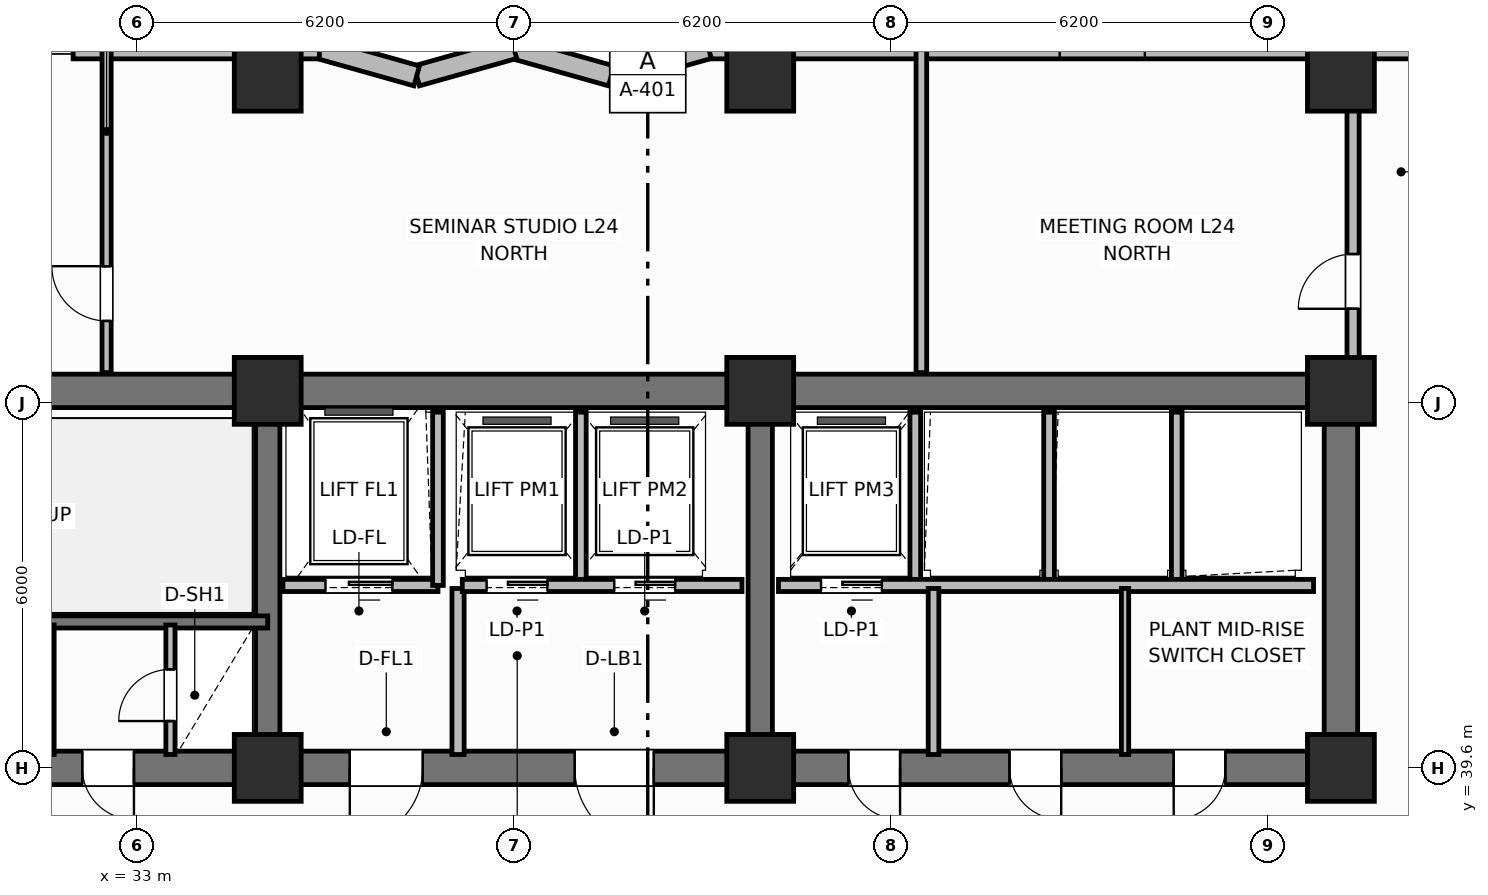
"""IFC4 building model, lengths in metres.
Left out: names, types, materials, properties, quantities, classifications, styles, units other than length and angle.
Written with IfcOpenShell. Run it as: python <this file> out.ifc"""

import sys

from ifc_helpers import new_model, si_unit, direction, frame, frame_2d, origin, origin_2d, place, context, subcontext, project, spatial, rectangle, extrude, element, fill, save


model = new_model("IFC4")
c1 = context("Model", 3, precision=1e-05, world=origin(), true_north=direction((0.0, 1.0)))
c2 = subcontext(c1, "Body", "Model", "MODEL_VIEW")
j1 = project(units=[si_unit("LENGTHUNIT", "METRE"), si_unit("PLANEANGLEUNIT", "RADIAN")], contexts=[c1])
p1 = place(None, origin())
s1 = spatial("IfcSite", under=j1, at=p1, CompositionType="ELEMENT")
p2 = place(p1, origin())
s2 = spatial("IfcBuilding", under=s1, at=p2, CompositionType="ELEMENT")
p3 = place(p2, frame((0.0, 0.0, 99.4)))
s3 = spatial("IfcBuildingStorey", under=s2, at=p3, CompositionType="ELEMENT", Elevation=99.4)
p4 = place(p3, frame((25.6, 45.8, 0.0), z_axis=(0.0, 0.0, 1.0), x_axis=(1.0, 0.0, 0.0)))
e1 = element("IfcWall", 1, at=p4, inside=s3, PredefinedType="SHEAR", context=c2, shape_type="SweptSolid", body=[
    extrude(rectangle(XDim=27.2, YDim=0.55, at=frame_2d((13.6, 0.0))), origin(), (0.0, 0.0, 1.0), 3.7),
])
p5 = place(p3, frame((52.8, 39.875, 0.0), z_axis=(0.0, 0.0, 1.0), x_axis=(0.0, 1.0, 0.0)))
e2 = element("IfcWall", 2, at=p5, inside=s3, PredefinedType="SHEAR", context=c2, shape_type="SweptSolid", body=[
    extrude(rectangle(XDim=5.65, YDim=0.55, at=frame_2d((2.825, 0.0))), origin(), (0.0, 0.0, 1.0), 3.7),
])
p6 = place(p3, frame((52.8, 39.6, 0.0), z_axis=(0.0, 0.0, 1.0), x_axis=(-1.0, 0.0, 0.0)))
e3 = element("IfcWall", 3, at=p6, inside=s3, PredefinedType="SHEAR", context=c2, shape_type="SweptSolid", body=[
    extrude(rectangle(XDim=27.2, YDim=0.55, at=frame_2d((13.6, 0.0))), origin(), (0.0, 0.0, 1.0), 3.7),
])
p7 = place(p6, frame((24.3, 0.0, 0.0)))
e4 = element("IfcOpeningElement", 4, at=p7, cuts=e3, PredefinedType="OPENING", context=c2, shape_type="SweptSolid", body=[
    extrude(rectangle(XDim=1.1, YDim=2.15, at=frame_2d((0.55, 1.075))), frame((0.0, 0.285, 0.0), z_axis=(0.0, -1.0, 0.0), x_axis=(1.0, 0.0, 0.0)), (0.0, 0.0, 1.0), 0.57),
])
p8 = place(p6, frame((21.85, 0.0, 0.0)))
e5 = element("IfcOpeningElement", 5, at=p8, cuts=e3, PredefinedType="OPENING", context=c2, shape_type="SweptSolid", body=[
    extrude(rectangle(XDim=0.85, YDim=2.1, at=frame_2d((0.425, 1.05))), frame((0.0, 0.285, 0.0), z_axis=(0.0, -1.0, 0.0), x_axis=(1.0, 0.0, 0.0)), (0.0, 0.0, 1.0), 0.57),
])
p9 = place(p6, frame((19.85, 0.0, 0.0)))
e6 = element("IfcOpeningElement", 6, at=p9, cuts=e3, PredefinedType="OPENING", context=c2, shape_type="SweptSolid", body=[
    extrude(rectangle(XDim=0.85, YDim=2.1, at=frame_2d((0.425, 1.05))), frame((0.0, 0.285, 0.0), z_axis=(0.0, -1.0, 0.0), x_axis=(1.0, 0.0, 0.0)), (0.0, 0.0, 1.0), 0.57),
])
p10 = place(p6, frame((15.1, 0.0, 0.0)))
e7 = element("IfcOpeningElement", 7, at=p10, cuts=e3, PredefinedType="OPENING", context=c2, shape_type="SweptSolid", body=[
    extrude(rectangle(XDim=1.2, YDim=2.15, at=frame_2d((0.6, 1.075))), frame((0.0, 0.285, 0.0), z_axis=(0.0, -1.0, 0.0), x_axis=(1.0, 0.0, 0.0)), (0.0, 0.0, 1.0), 0.57),
])
p11 = place(p6, frame((11.3, 0.0, 0.0)))
e8 = element("IfcOpeningElement", 8, at=p11, cuts=e3, PredefinedType="OPENING", context=c2, shape_type="SweptSolid", body=[
    extrude(rectangle(XDim=1.3, YDim=2.2, at=frame_2d((0.65, 1.1))), frame((0.0, 0.285, 0.0), z_axis=(0.0, -1.0, 0.0), x_axis=(1.0, 0.0, 0.0)), (0.0, 0.0, 1.0), 0.57),
])
p12 = place(p6, frame((7.25, 0.0, 0.0)))
e9 = element("IfcOpeningElement", 9, at=p12, cuts=e3, PredefinedType="OPENING", context=c2, shape_type="SweptSolid", body=[
    extrude(rectangle(XDim=0.85, YDim=2.1, at=frame_2d((0.425, 1.05))), frame((0.0, 0.285, 0.0), z_axis=(0.0, -1.0, 0.0), x_axis=(1.0, 0.0, 0.0)), (0.0, 0.0, 1.0), 0.57),
])
p13 = place(p6, frame((4.6, 0.0, 0.0)))
e10 = element("IfcOpeningElement", 10, at=p13, cuts=e3, PredefinedType="OPENING", context=c2, shape_type="SweptSolid", body=[
    extrude(rectangle(XDim=0.85, YDim=2.1, at=frame_2d((0.425, 1.05))), frame((0.0, 0.285, 0.0), z_axis=(0.0, -1.0, 0.0), x_axis=(1.0, 0.0, 0.0)), (0.0, 0.0, 1.0), 0.57),
])
p14 = place(p6, frame((1.9, 0.0, 0.0)))
e11 = element("IfcOpeningElement", 11, at=p14, cuts=e3, PredefinedType="OPENING", context=c2, shape_type="SweptSolid", body=[
    extrude(rectangle(XDim=0.85, YDim=2.1, at=frame_2d((0.425, 1.05))), frame((0.0, 0.285, 0.0), z_axis=(0.0, -1.0, 0.0), x_axis=(1.0, 0.0, 0.0)), (0.0, 0.0, 1.0), 0.57),
])
for number, where, z_axis, x_axis in (
    (12, (35.15, 39.875, 0.0), (0.0, 0.0, 1.0), (0.0, 1.0, 0.0)),
    (13, (43.25, 39.875, 0.0), (0.0, 0.0, 1.0), (0.0, 1.0, 0.0)),
):
    element("IfcWall", number, at=place(p3, frame(where, z_axis=z_axis, x_axis=x_axis)), inside=s3, PredefinedType="SHEAR", context=c2, shape_type="SweptSolid", body=[
        extrude(rectangle(XDim=5.65, YDim=0.4, at=frame_2d((2.825, 0.0))), origin(), (0.0, 0.0, 1.0), 3.7),
    ])
for number, where, z_axis, x_axis in (
    (14, (35.15, 39.6, 0.0), (0.0, 0.0, 1.0), (1.0, 0.0, 0.0)),
    (15, (35.15, 45.8, 0.0), (0.0, 0.0, 1.0), (1.0, 0.0, 0.0)),
    (16, (43.25, 39.6, 0.0), (0.0, 0.0, 1.0), (1.0, 0.0, 0.0)),
    (17, (43.25, 45.8, 0.0), (0.0, 0.0, 1.0), (1.0, 0.0, 0.0)),
    (18, (52.8, 39.6, 0.0), (0.0, 0.0, 1.0), (1.0, 0.0, 0.0)),
    (19, (52.8, 45.8, 0.0), (0.0, 0.0, 1.0), (1.0, 0.0, 0.0)),
    (20, (35.15, 50.95, 0.0), (0.0, 0.0, 1.0), (1.0, 0.0, 0.0)),
    (21, (43.25, 50.95, 0.0), (0.0, 0.0, 1.0), (1.0, 0.0, 0.0)),
    (22, (52.8, 50.95, 0.0), (0.0, 0.0, 1.0), (1.0, 0.0, 0.0)),
):
    element("IfcColumn", number, at=place(p3, frame(where, z_axis=z_axis, x_axis=x_axis)), inside=s3, PredefinedType="COLUMN", context=c2, shape_type="SweptSolid", body=[
        extrude(rectangle(XDim=1.1, YDim=1.1, at=origin_2d()), origin(), (0.0, 0.0, 1.0), 3.7),
    ])
p15 = place(p3, frame((55.35, 51.43, 0.0), z_axis=(0.0, 0.0, 1.0), x_axis=(-1.0, 0.0, 0.0)))
e23 = element("IfcWall", 23, at=p15, inside=s3, PredefinedType="SOLIDWALL", context=c2, shape_type="SweptSolid", body=[
    extrude(rectangle(XDim=12.95, YDim=0.34, at=frame_2d((6.475, 0.0))), origin(), (0.0, 0.0, 1.0), 2.7),
])
p16 = place(p15, frame((5.775, 0.0, 0.73)))
e24 = element("IfcOpeningElement", 24, at=p16, cuts=e23, PredefinedType="OPENING", context=c2, shape_type="SweptSolid", body=[
    extrude(rectangle(XDim=1.4, YDim=1.85, at=frame_2d((0.7, 0.925))), frame((0.0, 0.18, 0.0), z_axis=(0.0, -1.0, 0.0), x_axis=(1.0, 0.0, 0.0)), (0.0, 0.0, 1.0), 0.36),
])
p17 = place(p3, frame((42.4, 51.43, 0.0), z_axis=(0.0, 0.0, 1.0), x_axis=(-0.962652136636, -0.270741322725, 0.0)))
e25 = element("IfcWall", 25, at=p17, inside=s3, PredefinedType="SOLIDWALL", context=c2, shape_type="SweptSolid", body=[
    extrude(rectangle(XDim=1.662, YDim=0.34, at=frame_2d((0.831, 0.0))), origin(), (0.0, 0.0, 1.0), 2.7),
])
p18 = place(p3, frame((40.8, 50.98, 0.0), z_axis=(0.0, 0.0, 1.0), x_axis=(-0.962662902433, 0.270703040766, 0.0)))
e26 = element("IfcWall", 26, at=p18, inside=s3, PredefinedType="SOLIDWALL", context=c2, shape_type="SweptSolid", body=[
    extrude(rectangle(XDim=1.662, YDim=0.34, at=frame_2d((0.831, 0.0))), origin(), (0.0, 0.0, 1.0), 2.7),
])
p19 = place(p3, frame((39.2, 51.43, 0.0), z_axis=(0.0, 0.0, 1.0), x_axis=(-0.962652136636, -0.270741322725, 0.0)))
e27 = element("IfcWall", 27, at=p19, inside=s3, PredefinedType="SOLIDWALL", context=c2, shape_type="SweptSolid", body=[
    extrude(rectangle(XDim=1.662, YDim=0.34, at=frame_2d((0.831, 0.0))), origin(), (0.0, 0.0, 1.0), 2.7),
])
p20 = place(p3, frame((37.6, 50.98, 0.0), z_axis=(0.0, 0.0, 1.0), x_axis=(-0.962662902433, 0.270703040766, 0.0)))
e28 = element("IfcWall", 28, at=p20, inside=s3, PredefinedType="SOLIDWALL", context=c2, shape_type="SweptSolid", body=[
    extrude(rectangle(XDim=1.662, YDim=0.34, at=frame_2d((0.831, 0.0))), origin(), (0.0, 0.0, 1.0), 2.7),
])
p21 = place(p3, frame((36.0, 51.43, 0.0), z_axis=(0.0, 0.0, 1.0), x_axis=(-1.0, 0.0, 0.0)))
e29 = element("IfcWall", 29, at=p21, inside=s3, PredefinedType="SOLIDWALL", context=c2, shape_type="SweptSolid", body=[
    extrude(rectangle(XDim=4.05, YDim=0.34, at=frame_2d((2.025, 0.0))), origin(), (0.0, 0.0, 1.0), 2.7),
])
p22 = place(p3, frame((35.15, 42.0, 0.0), z_axis=(0.0, 0.0, 1.0), x_axis=(-1.0, 0.0, 0.0)))
e30 = element("IfcWall", 30, at=p22, inside=s3, PredefinedType="SHEAR", context=c2, shape_type="SweptSolid", body=[
    extrude(rectangle(XDim=9.55, YDim=0.2, at=frame_2d((4.775, 0.0))), origin(), (0.0, 0.0, 1.0), 3.7),
])
p23 = place(p22, frame((7.25, 0.0, 0.0)))
e31 = element("IfcOpeningElement", 31, at=p23, cuts=e30, PredefinedType="OPENING", context=c2, shape_type="SweptSolid", body=[
    extrude(rectangle(XDim=1.1, YDim=2.15, at=frame_2d((0.55, 1.075))), frame((0.0, 0.11, 0.0), z_axis=(0.0, -1.0, 0.0), x_axis=(1.0, 0.0, 0.0)), (0.0, 0.0, 1.0), 0.22),
])
p24 = place(p3, frame((33.55, 39.82, 0.0), z_axis=(0.0, 0.0, 1.0), x_axis=(0.0, 1.0, 0.0)))
e32 = element("IfcWall", 32, at=p24, inside=s3, PredefinedType="PARTITIONING", context=c2, shape_type="SweptSolid", body=[
    extrude(rectangle(XDim=2.13, YDim=0.15, at=frame_2d((1.065, 0.0))), origin(), (0.0, 0.0, 1.0), 2.53),
])
p25 = place(p24, frame((0.55, 0.0, 0.0)))
e33 = element("IfcOpeningElement", 33, at=p25, cuts=e32, PredefinedType="OPENING", context=c2, shape_type="SweptSolid", body=[
    extrude(rectangle(XDim=0.85, YDim=2.05, at=frame_2d((0.425, 1.025))), frame((0.0, 0.085, 0.0), z_axis=(0.0, -1.0, 0.0), x_axis=(1.0, 0.0, 0.0)), (0.0, 0.0, 1.0), 0.17),
])
p26 = place(p3, frame((31.55, 39.82, 0.0), z_axis=(0.0, 0.0, 1.0), x_axis=(0.0, 1.0, 0.0)))
e34 = element("IfcWall", 34, at=p26, inside=s3, PredefinedType="PARTITIONING", context=c2, shape_type="SweptSolid", body=[
    extrude(rectangle(XDim=2.13, YDim=0.175, at=frame_2d((1.065, 0.0))), origin(), (0.0, 0.0, 1.0), 2.53),
])
p27 = place(p3, frame((37.95, 42.6, 0.0), z_axis=(0.0, 0.0, 1.0), x_axis=(-1.0, 0.0, 0.0)))
e35 = element("IfcWall", 35, at=p27, inside=s3, PredefinedType="PARTITIONING", context=c2, shape_type="SweptSolid", body=[
    extrude(rectangle(XDim=2.55, YDim=0.2, at=frame_2d((1.275, 0.0))), origin(), (0.0, 0.0, 1.0), 2.3),
])
p28 = place(p27, frame((0.75, 0.0, 0.0)))
e36 = element("IfcOpeningElement", 36, at=p28, cuts=e35, PredefinedType="OPENING", context=c2, shape_type="SweptSolid", body=[
    extrude(rectangle(XDim=1.1, YDim=2.15, at=frame_2d((0.55, 1.075))), frame((0.0, 0.11, 0.0), z_axis=(0.0, -1.0, 0.0), x_axis=(1.0, 0.0, 0.0)), (0.0, 0.0, 1.0), 0.22),
])
p29 = place(p3, frame((37.95, 42.6, 0.0), z_axis=(0.0, 0.0, 1.0), x_axis=(0.0, 1.0, 0.0)))
e37 = element("IfcWall", 37, at=p29, inside=s3, PredefinedType="PARTITIONING", context=c2, shape_type="SweptSolid", body=[
    extrude(rectangle(XDim=2.85, YDim=0.175, at=frame_2d((1.425, 0.0))), origin(), (0.0, 0.0, 1.0), 2.53),
])
p30 = place(p3, frame((38.28, 39.82, 0.0), z_axis=(0.0, 0.0, 1.0), x_axis=(0.0, 1.0, 0.0)))
e38 = element("IfcWall", 38, at=p30, inside=s3, PredefinedType="PARTITIONING", context=c2, shape_type="SweptSolid", body=[
    extrude(rectangle(XDim=2.73, YDim=0.2, at=frame_2d((1.365, 0.0))), origin(), (0.0, 0.0, 1.0), 2.53),
])
p31 = place(p3, frame((40.3, 42.65, 0.0), z_axis=(0.0, 0.0, 1.0), x_axis=(0.0, 1.0, 0.0)))
e39 = element("IfcWall", 39, at=p31, inside=s3, PredefinedType="PARTITIONING", context=c2, shape_type="SweptSolid", body=[
    extrude(rectangle(XDim=2.8, YDim=0.175, at=frame_2d((1.4, 0.0))), origin(), (0.0, 0.0, 1.0), 2.53),
])
p32 = place(p3, frame((42.95, 42.6, 0.0), z_axis=(0.0, 0.0, 1.0), x_axis=(-1.0, 0.0, 0.0)))
e40 = element("IfcWall", 40, at=p32, inside=s3, PredefinedType="PARTITIONING", context=c2, shape_type="SweptSolid", body=[
    extrude(rectangle(XDim=4.6, YDim=0.2, at=frame_2d((2.3, 0.0))), origin(), (0.0, 0.0, 1.0), 2.3),
])
p33 = place(p32, frame((3.2, 0.0, 0.0)))
e41 = element("IfcOpeningElement", 41, at=p33, cuts=e40, PredefinedType="OPENING", context=c2, shape_type="SweptSolid", body=[
    extrude(rectangle(XDim=1.0, YDim=2.15, at=frame_2d((0.5, 1.075))), frame((0.0, 0.11, 0.0), z_axis=(0.0, -1.0, 0.0), x_axis=(1.0, 0.0, 0.0)), (0.0, 0.0, 1.0), 0.22),
])
p34 = place(p32, frame((1.1, 0.0, 0.0)))
e42 = element("IfcOpeningElement", 42, at=p34, cuts=e40, PredefinedType="OPENING", context=c2, shape_type="SweptSolid", body=[
    extrude(rectangle(XDim=1.0, YDim=2.15, at=frame_2d((0.5, 1.075))), frame((0.0, 0.11, 0.0), z_axis=(0.0, -1.0, 0.0), x_axis=(1.0, 0.0, 0.0)), (0.0, 0.0, 1.0), 0.22),
])
for number, where, z_axis, x_axis in (
    (43, (45.8, 42.65, 0.0), (0.0, 0.0, 1.0), (0.0, 1.0, 0.0)),
    (44, (48.0, 42.65, 0.0), (0.0, 0.0, 1.0), (0.0, 1.0, 0.0)),
    (45, (50.1, 42.65, 0.0), (0.0, 0.0, 1.0), (0.0, 1.0, 0.0)),
):
    element("IfcWall", number, at=place(p3, frame(where, z_axis=z_axis, x_axis=x_axis)), inside=s3, PredefinedType="PARTITIONING", context=c2, shape_type="SweptSolid", body=[
        extrude(rectangle(XDim=2.8, YDim=0.175, at=frame_2d((1.4, 0.0))), origin(), (0.0, 0.0, 1.0), 2.53),
    ])
p35 = place(p3, frame((52.35, 42.6, 0.0), z_axis=(0.0, 0.0, 1.0), x_axis=(-1.0, 0.0, 0.0)))
e46 = element("IfcWall", 46, at=p35, inside=s3, PredefinedType="PARTITIONING", context=c2, shape_type="SweptSolid", body=[
    extrude(rectangle(XDim=8.8, YDim=0.2, at=frame_2d((4.4, 0.0))), origin(), (0.0, 0.0, 1.0), 2.53),
])
p36 = place(p35, frame((7.1, 0.0, 0.0)))
e47 = element("IfcOpeningElement", 47, at=p36, cuts=e46, PredefinedType="OPENING", context=c2, shape_type="SweptSolid", body=[
    extrude(rectangle(XDim=1.0, YDim=2.15, at=frame_2d((0.5, 1.075))), frame((0.0, 0.11, 0.0), z_axis=(0.0, -1.0, 0.0), x_axis=(1.0, 0.0, 0.0)), (0.0, 0.0, 1.0), 0.22),
])
p37 = place(p3, frame((46.1, 39.82, 0.0), z_axis=(0.0, 0.0, 1.0), x_axis=(0.0, 1.0, 0.0)))
e48 = element("IfcWall", 48, at=p37, inside=s3, PredefinedType="PARTITIONING", context=c2, shape_type="SweptSolid", body=[
    extrude(rectangle(XDim=2.73, YDim=0.175, at=frame_2d((1.365, 0.0))), origin(), (0.0, 0.0, 1.0), 2.53),
])
p38 = place(p3, frame((49.25, 39.82, 0.0), z_axis=(0.0, 0.0, 1.0), x_axis=(0.0, 1.0, 0.0)))
e49 = element("IfcWall", 49, at=p38, inside=s3, PredefinedType="PARTITIONING", context=c2, shape_type="SweptSolid", body=[
    extrude(rectangle(XDim=2.73, YDim=0.12, at=frame_2d((1.365, 0.0))), origin(), (0.0, 0.0, 1.0), 2.53),
])
p39 = place(p3, frame((32.5, 46.1, 0.0), z_axis=(0.0, 0.0, 1.0), x_axis=(0.0, 1.0, 0.0)))
e50 = element("IfcWall", 50, at=p39, inside=s3, PredefinedType="PARTITIONING", context=c2, shape_type="SweptSolid", body=[
    extrude(rectangle(XDim=5.33, YDim=0.15, at=frame_2d((2.665, 0.0))), origin(), (0.0, 0.0, 1.0), 2.53),
])
p40 = place(p39, frame((0.85, 0.0, 0.0)))
e51 = element("IfcOpeningElement", 51, at=p40, cuts=e50, PredefinedType="OPENING", context=c2, shape_type="SweptSolid", body=[
    extrude(rectangle(XDim=0.9, YDim=2.1, at=frame_2d((0.45, 1.05))), frame((0.0, 0.085, 0.0), z_axis=(0.0, -1.0, 0.0), x_axis=(1.0, 0.0, 0.0)), (0.0, 0.0, 1.0), 0.17),
])
p41 = place(p3, frame((45.9, 46.1, 0.0), z_axis=(0.0, 0.0, 1.0), x_axis=(0.0, 1.0, 0.0)))
e52 = element("IfcWall", 52, at=p41, inside=s3, PredefinedType="PARTITIONING", context=c2, shape_type="SweptSolid", body=[
    extrude(rectangle(XDim=5.33, YDim=0.175, at=frame_2d((2.665, 0.0))), origin(), (0.0, 0.0, 1.0), 2.53),
])
p42 = place(p3, frame((53.0, 46.1, 0.0), z_axis=(0.0, 0.0, 1.0), x_axis=(0.0, 1.0, 0.0)))
e53 = element("IfcWall", 53, at=p42, inside=s3, PredefinedType="PARTITIONING", context=c2, shape_type="SweptSolid", body=[
    extrude(rectangle(XDim=4.33, YDim=0.2, at=frame_2d((2.165, 0.0))), origin(), (0.0, 0.0, 1.0), 2.53),
])
p43 = place(p42, frame((1.05, 0.0, 0.0)))
e54 = element("IfcOpeningElement", 54, at=p43, cuts=e53, PredefinedType="OPENING", context=c2, shape_type="SweptSolid", body=[
    extrude(rectangle(XDim=0.9, YDim=2.1, at=frame_2d((0.45, 1.05))), frame((0.0, 0.11, 0.0), z_axis=(0.0, -1.0, 0.0), x_axis=(1.0, 0.0, 0.0)), (0.0, 0.0, 1.0), 0.22),
])
p44 = place(p25, origin())
e55 = element("IfcDoor", 55, at=p44, inside=s3, OperationType="SINGLE_SWING_LEFT", PredefinedType="TRAPDOOR", context=c2, shape_type="SweptSolid", body=[
    extrude(rectangle(XDim=0.85, YDim=2.05, at=frame_2d((0.425, 1.025))), frame((0.0, 0.025, 0.0), z_axis=(0.0, -1.0, 0.0), x_axis=(1.0, 0.0, 0.0)), (0.0, 0.0, 1.0), 0.05),
])
fill(e33, e55)
p45 = place(p28, origin())
e56 = element("IfcDoor", 56, at=p45, inside=s3, OperationType="SLIDING_TO_LEFT", PredefinedType="DOOR", context=c2, shape_type="SweptSolid", body=[
    extrude(rectangle(XDim=1.1, YDim=2.15, at=frame_2d((0.55, 1.075))), frame((0.0, 0.025, 0.0), z_axis=(0.0, -1.0, 0.0), x_axis=(1.0, 0.0, 0.0)), (0.0, 0.0, 1.0), 0.05),
])
fill(e36, e56)
p46 = place(p33, origin())
e57 = element("IfcDoor", 57, at=p46, inside=s3, OperationType="SLIDING_TO_LEFT", PredefinedType="DOOR", context=c2, shape_type="SweptSolid", body=[
    extrude(rectangle(XDim=1.0, YDim=2.15, at=frame_2d((0.5, 1.075))), frame((0.0, 0.025, 0.0), z_axis=(0.0, -1.0, 0.0), x_axis=(1.0, 0.0, 0.0)), (0.0, 0.0, 1.0), 0.05),
])
fill(e41, e57)
p47 = place(p34, origin())
e58 = element("IfcDoor", 58, at=p47, inside=s3, OperationType="SLIDING_TO_LEFT", PredefinedType="DOOR", context=c2, shape_type="SweptSolid", body=[
    extrude(rectangle(XDim=1.0, YDim=2.15, at=frame_2d((0.5, 1.075))), frame((0.0, 0.025, 0.0), z_axis=(0.0, -1.0, 0.0), x_axis=(1.0, 0.0, 0.0)), (0.0, 0.0, 1.0), 0.05),
])
fill(e42, e58)
p48 = place(p36, origin())
e59 = element("IfcDoor", 59, at=p48, inside=s3, OperationType="SLIDING_TO_LEFT", PredefinedType="DOOR", context=c2, shape_type="SweptSolid", body=[
    extrude(rectangle(XDim=1.0, YDim=2.15, at=frame_2d((0.5, 1.075))), frame((0.0, 0.025, 0.0), z_axis=(0.0, -1.0, 0.0), x_axis=(1.0, 0.0, 0.0)), (0.0, 0.0, 1.0), 0.05),
])
fill(e47, e59)
p49 = place(p40, origin())
e60 = element("IfcDoor", 60, at=p49, inside=s3, OperationType="SINGLE_SWING_RIGHT", PredefinedType="DOOR", context=c2, shape_type="SweptSolid", body=[
    extrude(rectangle(XDim=0.9, YDim=2.1, at=frame_2d((0.45, 1.05))), frame((0.0, 0.025, 0.0), z_axis=(0.0, -1.0, 0.0), x_axis=(1.0, 0.0, 0.0)), (0.0, 0.0, 1.0), 0.05),
])
fill(e51, e60)
p50 = place(p43, origin())
e61 = element("IfcDoor", 61, at=p50, inside=s3, OperationType="SINGLE_SWING_LEFT", PredefinedType="DOOR", context=c2, shape_type="SweptSolid", body=[
    extrude(rectangle(XDim=0.9, YDim=2.1, at=frame_2d((0.45, 1.05))), frame((0.0, 0.025, 0.0), z_axis=(0.0, -1.0, 0.0), x_axis=(1.0, 0.0, 0.0)), (0.0, 0.0, 1.0), 0.05),
])
fill(e54, e61)
p51 = place(p9, origin())
e62 = element("IfcDoor", 62, at=p51, inside=s3, OperationType="SINGLE_SWING_LEFT", PredefinedType="DOOR", context=c2, shape_type="SweptSolid", body=[
    extrude(rectangle(XDim=0.85, YDim=2.1, at=frame_2d((0.425, 1.05))), frame((0.0, 0.025, 0.0), z_axis=(0.0, -1.0, 0.0), x_axis=(1.0, 0.0, 0.0)), (0.0, 0.0, 1.0), 0.05),
])
fill(e6, e62)
p52 = place(p10, origin())
e63 = element("IfcDoor", 63, at=p52, inside=s3, OperationType="SINGLE_SWING_RIGHT", PredefinedType="DOOR", context=c2, shape_type="SweptSolid", body=[
    extrude(rectangle(XDim=1.2, YDim=2.15, at=frame_2d((0.6, 1.075))), frame((0.0, 0.025, 0.0), z_axis=(0.0, -1.0, 0.0), x_axis=(1.0, 0.0, 0.0)), (0.0, 0.0, 1.0), 0.05),
])
fill(e7, e63)
p53 = place(p11, origin())
e64 = element("IfcDoor", 64, at=p53, inside=s3, OperationType="SINGLE_SWING_LEFT", PredefinedType="DOOR", context=c2, shape_type="SweptSolid", body=[
    extrude(rectangle(XDim=1.3, YDim=2.2, at=frame_2d((0.65, 1.1))), frame((0.0, 0.025, 0.0), z_axis=(0.0, -1.0, 0.0), x_axis=(1.0, 0.0, 0.0)), (0.0, 0.0, 1.0), 0.05),
])
fill(e8, e64)
p54 = place(p12, origin())
e65 = element("IfcDoor", 65, at=p54, inside=s3, OperationType="SINGLE_SWING_LEFT", PredefinedType="DOOR", context=c2, shape_type="SweptSolid", body=[
    extrude(rectangle(XDim=0.85, YDim=2.1, at=frame_2d((0.425, 1.05))), frame((0.0, 0.025, 0.0), z_axis=(0.0, -1.0, 0.0), x_axis=(1.0, 0.0, 0.0)), (0.0, 0.0, 1.0), 0.05),
])
fill(e9, e65)
p55 = place(p13, origin())
e66 = element("IfcDoor", 66, at=p55, inside=s3, OperationType="SINGLE_SWING_LEFT", PredefinedType="DOOR", context=c2, shape_type="SweptSolid", body=[
    extrude(rectangle(XDim=0.85, YDim=2.1, at=frame_2d((0.425, 1.05))), frame((0.0, 0.025, 0.0), z_axis=(0.0, -1.0, 0.0), x_axis=(1.0, 0.0, 0.0)), (0.0, 0.0, 1.0), 0.05),
])
fill(e10, e66)
p56 = place(p14, origin())
e67 = element("IfcDoor", 67, at=p56, inside=s3, OperationType="SINGLE_SWING_RIGHT", PredefinedType="DOOR", context=c2, shape_type="SweptSolid", body=[
    extrude(rectangle(XDim=0.85, YDim=2.1, at=frame_2d((0.425, 1.05))), frame((0.0, 0.025, 0.0), z_axis=(0.0, -1.0, 0.0), x_axis=(1.0, 0.0, 0.0)), (0.0, 0.0, 1.0), 0.05),
])
fill(e11, e67)
save(model, sys.argv[1])
